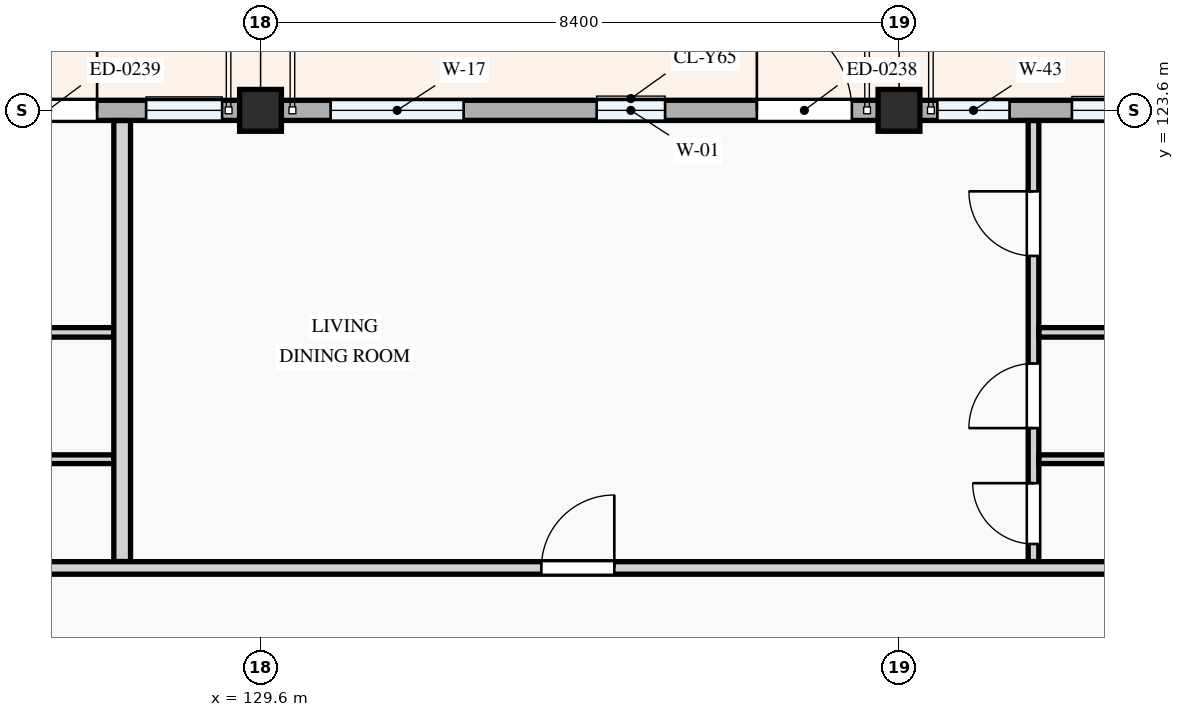
"""IFC4 building model, lengths in metres.
Left out: names, types, materials, properties, quantities, classifications, styles, units other than length and angle.
Written with IfcOpenShell. Run it as: python <this file> out.ifc"""

import sys

from ifc_helpers import new_model, si_unit, direction, frame, frame_2d, origin, origin_2d, place, context, subcontext, project, spatial, rectangle, extrude, element, fill, save


model = new_model("IFC4")
c1 = context("Model", 3, precision=1e-05, world=origin(), true_north=direction((0.0, 1.0)))
c2 = subcontext(c1, "Body", "Model", "MODEL_VIEW")
j1 = project(units=[si_unit("LENGTHUNIT", "METRE"), si_unit("PLANEANGLEUNIT", "RADIAN")], contexts=[c1])
p1 = place(None, origin())
s1 = spatial("IfcSite", under=j1, at=p1, CompositionType="ELEMENT")
p2 = place(p1, origin())
s2 = spatial("IfcBuilding", under=s1, at=p2, CompositionType="ELEMENT")
p3 = place(p2, frame((0.0, 0.0, 31.2)))
s3 = spatial("IfcBuildingStorey", under=s2, at=p3, CompositionType="ELEMENT", Elevation=31.2)
for number, where, z_axis, x_axis in (
    (1, (129.6, 123.6, 0.0), (0.0, 0.0, 1.0), (1.0, 0.0, 0.0)),
    (2, (138.0, 123.6, 0.0), (0.0, 0.0, 1.0), (1.0, 0.0, 0.0)),
):
    element("IfcColumn", number, at=place(p3, frame(where, z_axis=z_axis, x_axis=x_axis)), inside=s3, PredefinedType="COLUMN", context=c2, shape_type="SweptSolid", body=[
        extrude(rectangle(XDim=0.55, YDim=0.55, at=origin_2d()), origin(), (0.0, 0.0, 1.0), 3.3),
    ])
p4 = place(p3, frame((144.0, 123.6, 0.0), z_axis=(0.0, 0.0, 1.0), x_axis=(-1.0, 0.0, 0.0)))
e3 = element("IfcWall", 3, at=p4, inside=s3, PredefinedType="STANDARD", context=c2, shape_type="SweptSolid", body=[
    extrude(rectangle(XDim=6.0, YDim=0.265, at=frame_2d((3.0, 0.0))), origin(), (0.0, 0.0, 1.0), 2.525),
])
p5 = place(p4, frame((0.62, 0.0, 0.0)))
e4 = element("IfcOpeningElement", 4, at=p5, cuts=e3, PredefinedType="OPENING", context=c2, shape_type="SweptSolid", body=[
    extrude(rectangle(XDim=1.2, YDim=2.15, at=frame_2d((0.6, 1.075))), frame((0.0, 0.143, 0.0), z_axis=(0.0, -1.0, 0.0), x_axis=(1.0, 0.0, 0.0)), (0.0, 0.0, 1.0), 0.285),
])
p6 = place(p4, frame((2.375, 0.0, 0.78)))
e5 = element("IfcOpeningElement", 5, at=p6, cuts=e3, PredefinedType="OPENING", context=c2, shape_type="SweptSolid", body=[
    extrude(rectangle(XDim=1.35, YDim=1.55, at=frame_2d((0.675, 0.775))), frame((0.0, 0.143, 0.0), z_axis=(0.0, -1.0, 0.0), x_axis=(1.0, 0.0, 0.0)), (0.0, 0.0, 1.0), 0.285),
])
p7 = place(p4, frame((4.545, 0.0, 0.78)))
e6 = element("IfcOpeningElement", 6, at=p7, cuts=e3, PredefinedType="OPENING", context=c2, shape_type="SweptSolid", body=[
    extrude(rectangle(XDim=0.95, YDim=1.15, at=frame_2d((0.475, 0.575))), frame((0.0, 0.143, 0.0), z_axis=(0.0, -1.0, 0.0), x_axis=(1.0, 0.0, 0.0)), (0.0, 0.0, 1.0), 0.285),
])
p8 = place(p3, frame((138.0, 123.6, 0.0), z_axis=(0.0, 0.0, 1.0), x_axis=(-1.0, 0.0, 0.0)))
e7 = element("IfcWall", 7, at=p8, inside=s3, PredefinedType="STANDARD", context=c2, shape_type="SweptSolid", body=[
    extrude(rectangle(XDim=8.4, YDim=0.265, at=frame_2d((4.2, 0.0))), origin(), (0.0, 0.0, 1.0), 2.375),
])
p9 = place(p8, frame((0.62, 0.0, 0.0)))
e8 = element("IfcOpeningElement", 8, at=p9, cuts=e7, PredefinedType="OPENING", context=c2, shape_type="SweptSolid", body=[
    extrude(rectangle(XDim=1.25, YDim=2.2, at=frame_2d((0.625, 1.1))), frame((0.0, 0.143, 0.0), z_axis=(0.0, -1.0, 0.0), x_axis=(1.0, 0.0, 0.0)), (0.0, 0.0, 1.0), 0.285),
])
p10 = place(p8, frame((3.077, 0.0, 0.78)))
e9 = element("IfcOpeningElement", 9, at=p10, cuts=e7, PredefinedType="OPENING", context=c2, shape_type="SweptSolid", body=[
    extrude(rectangle(XDim=0.9, YDim=1.2, at=frame_2d((0.45, 0.6))), frame((0.0, 0.143, 0.0), z_axis=(0.0, -1.0, 0.0), x_axis=(1.0, 0.0, 0.0)), (0.0, 0.0, 1.0), 0.285),
])
p11 = place(p8, frame((5.728, 0.0, 0.78)))
e10 = element("IfcOpeningElement", 10, at=p11, cuts=e7, PredefinedType="OPENING", context=c2, shape_type="SweptSolid", body=[
    extrude(rectangle(XDim=1.75, YDim=1.45, at=frame_2d((0.875, 0.725))), frame((0.0, 0.143, 0.0), z_axis=(0.0, -1.0, 0.0), x_axis=(1.0, 0.0, 0.0)), (0.0, 0.0, 1.0), 0.285),
])
p12 = place(p3, frame((129.6, 123.6, 0.0), z_axis=(0.0, 0.0, 1.0), x_axis=(-1.0, 0.0, 0.0)))
e11 = element("IfcWall", 11, at=p12, inside=s3, PredefinedType="STANDARD", context=c2, shape_type="SweptSolid", body=[
    extrude(rectangle(XDim=6.0, YDim=0.265, at=frame_2d((3.0, 0.0))), origin(), (0.0, 0.0, 1.0), 2.525),
])
p13 = place(p12, frame((2.15, 0.0, 0.0)))
e12 = element("IfcOpeningElement", 12, at=p13, cuts=e11, PredefinedType="OPENING", context=c2, shape_type="SweptSolid", body=[
    extrude(rectangle(XDim=1.3, YDim=2.15, at=frame_2d((0.65, 1.075))), frame((0.0, 0.143, 0.0), z_axis=(0.0, -1.0, 0.0), x_axis=(1.0, 0.0, 0.0)), (0.0, 0.0, 1.0), 0.285),
])
p14 = place(p12, frame((0.505, 0.0, 0.78)))
e13 = element("IfcOpeningElement", 13, at=p14, cuts=e11, PredefinedType="OPENING", context=c2, shape_type="SweptSolid", body=[
    extrude(rectangle(XDim=1.0, YDim=1.25, at=frame_2d((0.5, 0.625))), frame((0.0, 0.143, 0.0), z_axis=(0.0, -1.0, 0.0), x_axis=(1.0, 0.0, 0.0)), (0.0, 0.0, 1.0), 0.285),
])
p15 = place(p12, frame((3.865, 0.0, 0.78)))
e14 = element("IfcOpeningElement", 14, at=p15, cuts=e11, PredefinedType="OPENING", context=c2, shape_type="SweptSolid", body=[
    extrude(rectangle(XDim=1.58, YDim=1.48, at=frame_2d((0.79, 0.74))), frame((0.0, 0.143, 0.0), z_axis=(0.0, -1.0, 0.0), x_axis=(1.0, 0.0, 0.0)), (0.0, 0.0, 1.0), 0.285),
])
p16 = place(p3, frame((117.049, 120.679, 0.0), z_axis=(0.0, 0.0, 1.0), x_axis=(1.0, 0.0, 0.0)))
e15 = element("IfcWall", 15, at=p16, inside=s3, PredefinedType="PARTITIONING", context=c2, shape_type="SweptSolid", body=[
    extrude(rectangle(XDim=10.619, YDim=0.125, at=frame_2d((5.31, 0.0))), origin(), (0.0, 0.0, 1.0), 3.0),
])
p17 = place(p3, frame((117.049, 119.01, 0.0), z_axis=(0.0, 0.0, 1.0), x_axis=(1.0, 0.0, 0.0)))
e16 = element("IfcWall", 16, at=p17, inside=s3, PredefinedType="PARTITIONING", context=c2, shape_type="SweptSolid", body=[
    extrude(rectangle(XDim=10.619, YDim=0.115, at=frame_2d((5.31, 0.0))), origin(), (0.0, 0.0, 1.0), 3.0),
])
p18 = place(p3, frame((139.77, 117.665, 0.0), z_axis=(0.0, 0.0, 1.0), x_axis=(0.0, 1.0, 0.0)))
e17 = element("IfcWall", 17, at=p18, inside=s3, PredefinedType="PARTITIONING", context=c2, shape_type="SweptSolid", body=[
    extrude(rectangle(XDim=5.801, YDim=0.14, at=frame_2d((2.9, 0.0))), origin(), (0.0, 0.0, 1.0), 3.0),
])
p19 = place(p18, frame((0.231, 0.0, 0.0)))
e18 = element("IfcOpeningElement", 18, at=p19, cuts=e17, PredefinedType="OPENING", context=c2, shape_type="SweptSolid", body=[
    extrude(rectangle(XDim=0.8, YDim=2.1, at=frame_2d((0.4, 1.05))), frame((0.0, 0.08, 0.0), z_axis=(0.0, -1.0, 0.0), x_axis=(1.0, 0.0, 0.0)), (0.0, 0.0, 1.0), 0.16),
])
p20 = place(p18, frame((1.755, 0.0, 0.0)))
e19 = element("IfcOpeningElement", 19, at=p20, cuts=e17, PredefinedType="OPENING", context=c2, shape_type="SweptSolid", body=[
    extrude(rectangle(XDim=0.85, YDim=2.1, at=frame_2d((0.425, 1.05))), frame((0.0, 0.08, 0.0), z_axis=(0.0, -1.0, 0.0), x_axis=(1.0, 0.0, 0.0)), (0.0, 0.0, 1.0), 0.16),
])
p21 = place(p18, frame((4.02, 0.0, 0.0)))
e20 = element("IfcOpeningElement", 20, at=p21, cuts=e17, PredefinedType="OPENING", context=c2, shape_type="SweptSolid", body=[
    extrude(rectangle(XDim=0.85, YDim=2.1, at=frame_2d((0.425, 1.05))), frame((0.0, 0.08, 0.0), z_axis=(0.0, -1.0, 0.0), x_axis=(1.0, 0.0, 0.0)), (0.0, 0.0, 1.0), 0.16),
])
p22 = place(p3, frame((139.842, 120.679, 0.0), z_axis=(0.0, 0.0, 1.0), x_axis=(1.0, 0.0, 0.0)))
e21 = element("IfcWall", 21, at=p22, inside=s3, PredefinedType="PARTITIONING", context=c2, shape_type="SweptSolid", body=[
    extrude(rectangle(XDim=10.208, YDim=0.125, at=frame_2d((5.104, 0.0))), origin(), (0.0, 0.0, 1.0), 3.0),
])
p23 = place(p3, frame((139.842, 119.01, 0.0), z_axis=(0.0, 0.0, 1.0), x_axis=(1.0, 0.0, 0.0)))
e22 = element("IfcWall", 22, at=p23, inside=s3, PredefinedType="PARTITIONING", context=c2, shape_type="SweptSolid", body=[
    extrude(rectangle(XDim=10.208, YDim=0.115, at=frame_2d((5.104, 0.0))), origin(), (0.0, 0.0, 1.0), 3.0),
])
p24 = place(p3, frame((127.78, 117.665, 0.0), z_axis=(0.0, 0.0, 1.0), x_axis=(0.0, 1.0, 0.0)))
e23 = element("IfcWall", 23, at=p24, inside=s3, PredefinedType="PARTITIONING", context=c2, shape_type="SweptSolid", body=[
    extrude(rectangle(XDim=5.801, YDim=0.22, at=frame_2d((2.9, 0.0))), origin(), (0.0, 0.0, 1.0), 3.0),
])
p25 = place(p3, frame((80.534, 117.58, 0.0), z_axis=(0.0, 0.0, 1.0), x_axis=(1.0, 0.0, 0.0)))
e24 = element("IfcWall", 24, at=p25, inside=s3, PredefinedType="PARTITIONING", context=c2, shape_type="SweptSolid", body=[
    extrude(rectangle(XDim=72.006, YDim=0.165, at=frame_2d((36.003, 0.0))), origin(), (0.0, 0.0, 1.0), 3.0),
])
p26 = place(p25, frame((9.454, 0.0, 0.0)))
e25 = element("IfcOpeningElement", 25, at=p26, cuts=e24, PredefinedType="OPENING", context=c2, shape_type="SweptSolid", body=[
    extrude(rectangle(XDim=0.92, YDim=2.1, at=frame_2d((0.46, 1.05))), frame((0.0, 0.093, 0.0), z_axis=(0.0, -1.0, 0.0), x_axis=(1.0, 0.0, 0.0)), (0.0, 0.0, 1.0), 0.185),
])
p27 = place(p25, frame((23.835, 0.0, 0.0)))
e26 = element("IfcOpeningElement", 26, at=p27, cuts=e24, PredefinedType="OPENING", context=c2, shape_type="SweptSolid", body=[
    extrude(rectangle(XDim=0.92, YDim=2.1, at=frame_2d((0.46, 1.05))), frame((0.0, 0.093, 0.0), z_axis=(0.0, -1.0, 0.0), x_axis=(1.0, 0.0, 0.0)), (0.0, 0.0, 1.0), 0.185),
])
p28 = place(p25, frame((52.76, 0.0, 0.0)))
e27 = element("IfcOpeningElement", 27, at=p28, cuts=e24, PredefinedType="OPENING", context=c2, shape_type="SweptSolid", body=[
    extrude(rectangle(XDim=0.96, YDim=2.12, at=frame_2d((0.48, 1.06))), frame((0.0, 0.093, 0.0), z_axis=(0.0, -1.0, 0.0), x_axis=(1.0, 0.0, 0.0)), (0.0, 0.0, 1.0), 0.185),
])
p29 = place(p6, origin())
e28 = element("IfcWindow", 28, at=p29, inside=s3, PartitioningType="SINGLE_PANEL", PredefinedType="WINDOW", context=c2, shape_type="SweptSolid", body=[
    extrude(rectangle(XDim=1.35, YDim=1.55, at=frame_2d((0.675, 0.775))), frame((0.0, 0.03, 0.0), z_axis=(0.0, -1.0, 0.0), x_axis=(1.0, 0.0, 0.0)), (0.0, 0.0, 1.0), 0.06),
])
fill(e5, e28)
p30 = place(p7, origin())
e29 = element("IfcWindow", 29, at=p30, inside=s3, PartitioningType="SINGLE_PANEL", PredefinedType="WINDOW", context=c2, shape_type="SweptSolid", body=[
    extrude(rectangle(XDim=0.95, YDim=1.15, at=frame_2d((0.475, 0.575))), frame((0.0, 0.03, 0.0), z_axis=(0.0, -1.0, 0.0), x_axis=(1.0, 0.0, 0.0)), (0.0, 0.0, 1.0), 0.06),
])
fill(e6, e29)
p31 = place(p9, frame((1.25, 0.0, 0.0), z_axis=(0.0, 0.0, 1.0), x_axis=(-1.0, 0.0, 0.0)))
e30 = element("IfcDoor", 30, at=p31, inside=s3, OperationType="SINGLE_SWING_LEFT", PredefinedType="DOOR", context=c2, shape_type="SweptSolid", body=[
    extrude(rectangle(XDim=1.25, YDim=2.2, at=frame_2d((0.625, 1.1))), frame((0.0, 0.025, 0.0), z_axis=(0.0, -1.0, 0.0), x_axis=(1.0, 0.0, 0.0)), (0.0, 0.0, 1.0), 0.05),
])
fill(e8, e30)
p32 = place(p10, origin())
e31 = element("IfcWindow", 31, at=p32, inside=s3, PartitioningType="SINGLE_PANEL", PredefinedType="WINDOW", context=c2, shape_type="SweptSolid", body=[
    extrude(rectangle(XDim=0.9, YDim=1.2, at=frame_2d((0.45, 0.6))), frame((0.0, 0.03, 0.0), z_axis=(0.0, -1.0, 0.0), x_axis=(1.0, 0.0, 0.0)), (0.0, 0.0, 1.0), 0.06),
])
fill(e9, e31)
p33 = place(p11, origin())
e32 = element("IfcWindow", 32, at=p33, inside=s3, PartitioningType="DOUBLE_PANEL_VERTICAL", PredefinedType="WINDOW", context=c2, shape_type="SweptSolid", body=[
    extrude(rectangle(XDim=1.75, YDim=1.45, at=frame_2d((0.875, 0.725))), frame((0.0, 0.03, 0.0), z_axis=(0.0, -1.0, 0.0), x_axis=(1.0, 0.0, 0.0)), (0.0, 0.0, 1.0), 0.06),
])
fill(e10, e32)
p34 = place(p13, frame((1.3, 0.0, 0.0), z_axis=(0.0, 0.0, 1.0), x_axis=(-1.0, 0.0, 0.0)))
e33 = element("IfcDoor", 33, at=p34, inside=s3, OperationType="SINGLE_SWING_RIGHT", PredefinedType="DOOR", context=c2, shape_type="SweptSolid", body=[
    extrude(rectangle(XDim=1.3, YDim=2.15, at=frame_2d((0.65, 1.075))), frame((0.0, 0.025, 0.0), z_axis=(0.0, -1.0, 0.0), x_axis=(1.0, 0.0, 0.0)), (0.0, 0.0, 1.0), 0.05),
])
fill(e12, e33)
p35 = place(p14, origin())
e34 = element("IfcWindow", 34, at=p35, inside=s3, PartitioningType="SINGLE_PANEL", PredefinedType="WINDOW", context=c2, shape_type="SweptSolid", body=[
    extrude(rectangle(XDim=1.0, YDim=1.25, at=frame_2d((0.5, 0.625))), frame((0.0, 0.03, 0.0), z_axis=(0.0, -1.0, 0.0), x_axis=(1.0, 0.0, 0.0)), (0.0, 0.0, 1.0), 0.06),
])
fill(e13, e34)
p36 = place(p19, origin())
e35 = element("IfcDoor", 35, at=p36, inside=s3, OperationType="SINGLE_SWING_RIGHT", PredefinedType="DOOR", context=c2, shape_type="SweptSolid", body=[
    extrude(rectangle(XDim=0.8, YDim=2.1, at=frame_2d((0.4, 1.05))), frame((0.0, 0.025, 0.0), z_axis=(0.0, -1.0, 0.0), x_axis=(1.0, 0.0, 0.0)), (0.0, 0.0, 1.0), 0.05),
])
fill(e18, e35)
p37 = place(p20, origin())
e36 = element("IfcDoor", 36, at=p37, inside=s3, OperationType="SINGLE_SWING_LEFT", PredefinedType="DOOR", context=c2, shape_type="SweptSolid", body=[
    extrude(rectangle(XDim=0.85, YDim=2.1, at=frame_2d((0.425, 1.05))), frame((0.0, 0.025, 0.0), z_axis=(0.0, -1.0, 0.0), x_axis=(1.0, 0.0, 0.0)), (0.0, 0.0, 1.0), 0.05),
])
fill(e19, e36)
p38 = place(p21, origin())
e37 = element("IfcDoor", 37, at=p38, inside=s3, OperationType="SINGLE_SWING_RIGHT", PredefinedType="DOOR", context=c2, shape_type="SweptSolid", body=[
    extrude(rectangle(XDim=0.85, YDim=2.1, at=frame_2d((0.425, 1.05))), frame((0.0, 0.025, 0.0), z_axis=(0.0, -1.0, 0.0), x_axis=(1.0, 0.0, 0.0)), (0.0, 0.0, 1.0), 0.05),
])
fill(e20, e37)
p39 = place(p28, origin())
e38 = element("IfcDoor", 38, at=p39, inside=s3, OperationType="SINGLE_SWING_RIGHT", PredefinedType="DOOR", context=c2, shape_type="SweptSolid", body=[
    extrude(rectangle(XDim=0.96, YDim=2.12, at=frame_2d((0.48, 1.06))), frame((0.0, 0.025, 0.0), z_axis=(0.0, -1.0, 0.0), x_axis=(1.0, 0.0, 0.0)), (0.0, 0.0, 1.0), 0.05),
])
fill(e27, e38)
save(model, sys.argv[1])
